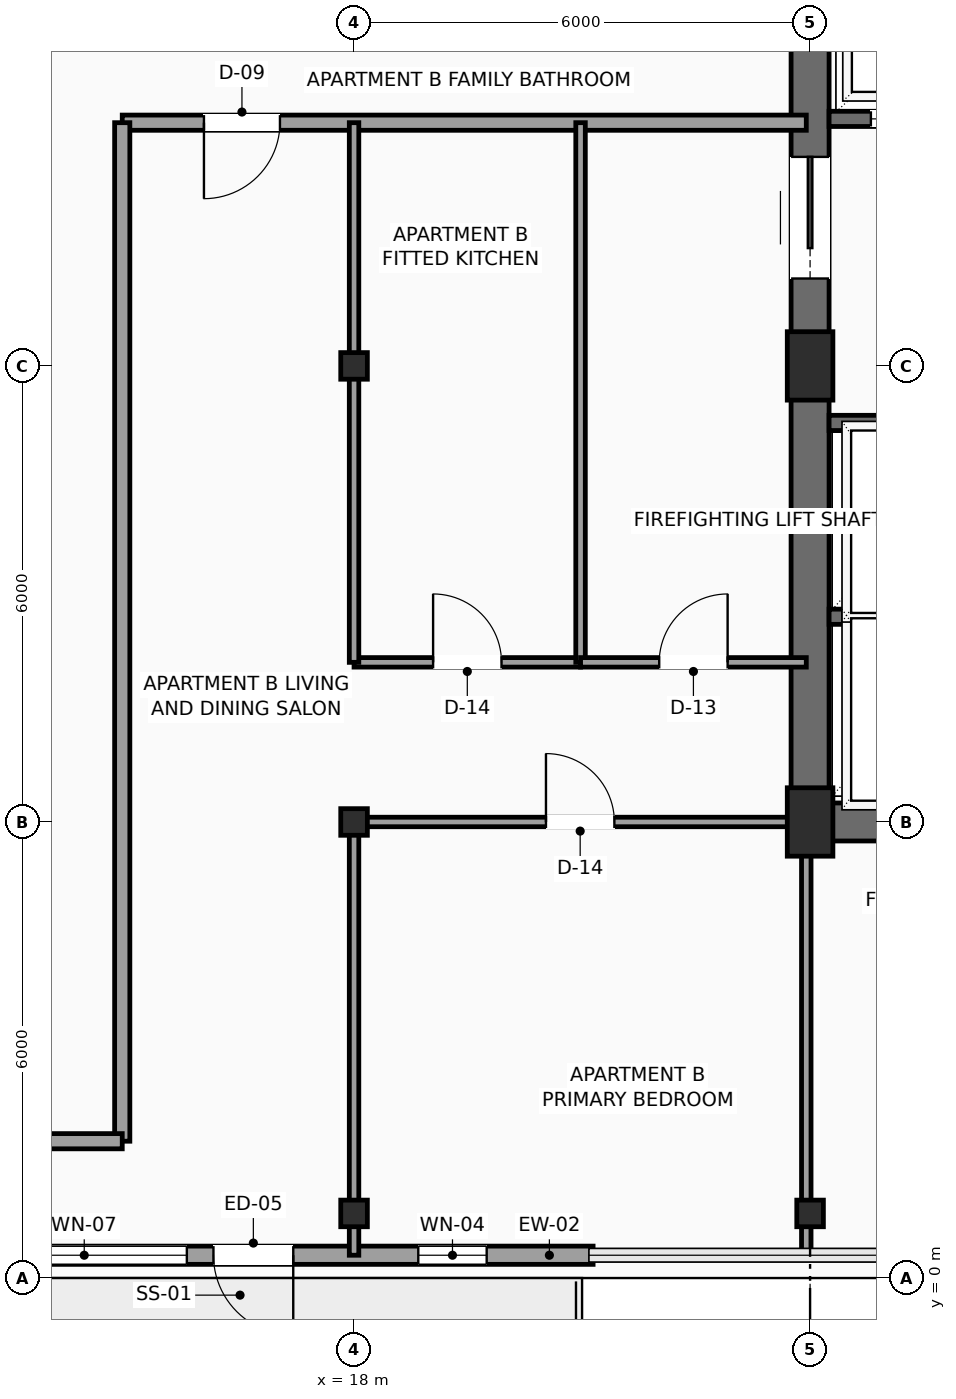
"""IFC4 building model, lengths in metres.
Left out: names, types, materials, properties, quantities, classifications, styles, units other than length and angle.
Written with IfcOpenShell. Run it as: python <this file> out.ifc"""

import sys

from ifc_helpers import new_model, si_unit, direction, frame, frame_2d, origin, origin_2d, place, context, subcontext, project, spatial, rectangle, hollow_rectangle, extrude, element, fill, save


model = new_model("IFC4")
c1 = context("Model", 3, precision=1e-05, world=origin(), true_north=direction((0.0, 1.0)))
c2 = subcontext(c1, "Body", "Model", "MODEL_VIEW")
j1 = project(units=[si_unit("LENGTHUNIT", "METRE"), si_unit("PLANEANGLEUNIT", "RADIAN")], contexts=[c1])
p1 = place(None, origin())
s1 = spatial("IfcSite", under=j1, at=p1, CompositionType="ELEMENT")
p2 = place(p1, origin())
s2 = spatial("IfcBuilding", under=s1, at=p2, CompositionType="ELEMENT")
p3 = place(p2, frame((0.0, 0.0, 253.7)))
s3 = spatial("IfcBuildingStorey", under=s2, at=p3, CompositionType="ELEMENT", Elevation=253.7)
for number, where, z_axis, x_axis in (
    (1, (24.0, 6.0, 0.0), (0.0, 0.0, 1.0), (1.0, 0.0, 0.0)),
    (2, (24.0, 12.0, 0.0), (0.0, 0.0, 1.0), (1.0, 0.0, 0.0)),
):
    element("IfcColumn", number, at=place(p3, frame(where, z_axis=z_axis, x_axis=x_axis)), inside=s3, PredefinedType="COLUMN", context=c2, shape_type="SweptSolid", body=[
        extrude(rectangle(XDim=0.6, YDim=0.9, at=origin_2d()), origin(), (0.0, 0.0, 1.0), 3.5),
    ])
for number, where, z_axis, x_axis in (
    (3, (18.0, 0.85, 0.0), (0.0, 0.0, 1.0), (1.0, 0.0, 0.0)),
    (4, (18.0, 6.0, 0.0), (0.0, 0.0, 1.0), (1.0, 0.0, 0.0)),
    (5, (18.0, 12.0, 0.0), (0.0, 0.0, 1.0), (1.0, 0.0, 0.0)),
    (6, (24.0, 0.85, 0.0), (0.0, 0.0, 1.0), (1.0, 0.0, 0.0)),
):
    element("IfcColumn", number, at=place(p3, frame(where, z_axis=z_axis, x_axis=x_axis)), inside=s3, PredefinedType="COLUMN", context=c2, shape_type="SweptSolid", body=[
        extrude(hollow_rectangle(XDim=0.35, YDim=0.35, WallThickness=0.016, InnerFilletRadius=0.016, OuterFilletRadius=0.032, at=origin_2d()), origin(), (0.0, 0.0, 1.0), 3.5),
    ])
p4 = place(p3, frame((21.145, 0.3, 0.0), z_axis=(0.0, 0.0, 1.0), x_axis=(-1.0, 0.0, 0.0)))
e7 = element("IfcWall", 7, at=p4, inside=s3, PredefinedType="SOLIDWALL", context=c2, shape_type="SweptSolid", body=[
    extrude(rectangle(XDim=9.29, YDim=0.24, at=frame_2d((4.645, 0.0))), origin(), (0.0, 0.0, 1.0), 3.3),
])
p5 = place(p4, frame((3.945, 0.0, 0.0)))
e8 = element("IfcOpeningElement", 8, at=p5, cuts=e7, PredefinedType="OPENING", context=c2, shape_type="SweptSolid", body=[
    extrude(rectangle(XDim=1.05, YDim=2.2, at=frame_2d((0.525, 1.1))), frame((0.0, 0.13, 0.0), z_axis=(0.0, -1.0, 0.0), x_axis=(1.0, 0.0, 0.0)), (0.0, 0.0, 1.0), 0.26),
])
p6 = place(p4, frame((5.345, 0.0, 0.6)))
e9 = element("IfcOpeningElement", 9, at=p6, cuts=e7, PredefinedType="OPENING", context=c2, shape_type="SweptSolid", body=[
    extrude(rectangle(XDim=2.7, YDim=2.3, at=frame_2d((1.35, 1.15))), frame((0.0, 0.13, 0.0), z_axis=(0.0, -1.0, 0.0), x_axis=(1.0, 0.0, 0.0)), (0.0, 0.0, 1.0), 0.26),
])
p7 = place(p4, frame((1.4, 0.0, 0.6)))
e10 = element("IfcOpeningElement", 10, at=p7, cuts=e7, PredefinedType="OPENING", context=c2, shape_type="SweptSolid", body=[
    extrude(rectangle(XDim=0.9, YDim=2.2, at=frame_2d((0.45, 1.1))), frame((0.0, 0.13, 0.0), z_axis=(0.0, -1.0, 0.0), x_axis=(1.0, 0.0, 0.0)), (0.0, 0.0, 1.0), 0.26),
])
p8 = place(p3, frame((24.0, 6.0, 0.0), z_axis=(0.0, 0.0, 1.0), x_axis=(1.0, 0.0, 0.0)))
e11 = element("IfcWall", 11, at=p8, inside=s3, PredefinedType="SHEAR", context=c2, shape_type="SweptSolid", body=[
    extrude(rectangle(XDim=9.6, YDim=0.5, at=frame_2d((4.8, 0.0))), origin(), (0.0, 0.0, 1.0), 3.3),
])
p9 = place(p3, frame((24.0, 6.0, 0.0), z_axis=(0.0, 0.0, 1.0), x_axis=(0.0, 1.0, 0.0)))
e12 = element("IfcWall", 12, at=p9, inside=s3, PredefinedType="SHEAR", context=c2, shape_type="SweptSolid", body=[
    extrude(rectangle(XDim=12.0, YDim=0.5, at=frame_2d((6.0, 0.0))), origin(), (0.0, 0.0, 1.0), 3.3),
])
p10 = place(p9, frame((7.15, 0.0, 0.0)))
e13 = element("IfcOpeningElement", 13, at=p10, cuts=e12, PredefinedType="OPENING", context=c2, shape_type="SweptSolid", body=[
    extrude(rectangle(XDim=1.6, YDim=2.3, at=frame_2d((0.8, 1.15))), frame((0.0, 0.26, 0.0), z_axis=(0.0, -1.0, 0.0), x_axis=(1.0, 0.0, 0.0)), (0.0, 0.0, 1.0), 0.52),
])
for number, where, z_axis, x_axis in (
    (14, (24.25, 8.7, 0.0), (0.0, 0.0, 1.0), (1.0, 0.0, 0.0)),
    (15, (24.25, 11.25, 0.0), (0.0, 0.0, 1.0), (1.0, 0.0, 0.0)),
):
    element("IfcWall", number, at=place(p3, frame(where, z_axis=z_axis, x_axis=x_axis)), inside=s3, PredefinedType="SHEAR", context=c2, shape_type="SweptSolid", body=[
        extrude(rectangle(XDim=2.17, YDim=0.2, at=frame_2d((1.085, 0.0))), origin(), (0.0, 0.0, 1.0), 3.3),
    ])
p11 = place(p3, frame((24.25, 15.25, 0.0), z_axis=(0.0, 0.0, 1.0), x_axis=(1.0, 0.0, 0.0)))
e16 = element("IfcWall", 16, at=p11, inside=s3, PredefinedType="SHEAR", context=c2, shape_type="SweptSolid", body=[
    extrude(rectangle(XDim=5.2, YDim=0.2, at=frame_2d((2.6, 0.0))), origin(), (0.0, 0.0, 1.0), 3.3),
])
p12 = place(p11, frame((0.55, 0.0, 0.0)))
e17 = element("IfcOpeningElement", 17, at=p12, cuts=e16, PredefinedType="OPENING", context=c2, shape_type="SweptSolid", body=[
    extrude(rectangle(XDim=1.2, YDim=2.2, at=frame_2d((0.6, 1.1))), frame((0.0, 0.11, 0.0), z_axis=(0.0, -1.0, 0.0), x_axis=(1.0, 0.0, 0.0)), (0.0, 0.0, 1.0), 0.22),
])
p13 = place(p11, frame((3.15, 0.0, 0.0)))
e18 = element("IfcOpeningElement", 18, at=p13, cuts=e16, PredefinedType="OPENING", context=c2, shape_type="SweptSolid", body=[
    extrude(rectangle(XDim=1.2, YDim=2.2, at=frame_2d((0.6, 1.1))), frame((0.0, 0.11, 0.0), z_axis=(0.0, -1.0, 0.0), x_axis=(1.0, 0.0, 0.0)), (0.0, 0.0, 1.0), 0.22),
])
p14 = place(p3, frame((23.95, 15.2, 0.0), z_axis=(0.0, 0.0, 1.0), x_axis=(-1.0, 0.0, 0.0)))
e19 = element("IfcWall", 19, at=p14, inside=s3, PredefinedType="SOLIDWALL", context=c2, shape_type="SweptSolid", body=[
    extrude(rectangle(XDim=9.0, YDim=0.2, at=frame_2d((4.5, 0.0))), origin(), (0.0, 0.0, 1.0), 2.932),
])
p15 = place(p14, frame((6.925, 0.0, 0.0)))
e20 = element("IfcOpeningElement", 20, at=p15, cuts=e19, PredefinedType="OPENING", context=c2, shape_type="SweptSolid", body=[
    extrude(rectangle(XDim=1.0, YDim=2.2, at=frame_2d((0.5, 1.1))), frame((0.0, 0.11, 0.0), z_axis=(0.0, -1.0, 0.0), x_axis=(1.0, 0.0, 0.0)), (0.0, 0.0, 1.0), 0.22),
])
p16 = place(p3, frame((14.95, 15.2, 0.0), z_axis=(0.0, 0.0, 1.0), x_axis=(0.0, -1.0, 0.0)))
e21 = element("IfcWall", 21, at=p16, inside=s3, PredefinedType="SOLIDWALL", context=c2, shape_type="SweptSolid", body=[
    extrude(rectangle(XDim=13.4, YDim=0.2, at=frame_2d((6.7, 0.0))), origin(), (0.0, 0.0, 1.0), 3.3),
])
p17 = place(p3, frame((14.95, 1.8, 0.0), z_axis=(0.0, 0.0, 1.0), x_axis=(-1.0, 0.0, 0.0)))
e22 = element("IfcWall", 22, at=p17, inside=s3, PredefinedType="SOLIDWALL", context=c2, shape_type="SweptSolid", body=[
    extrude(rectangle(XDim=2.35, YDim=0.2, at=frame_2d((1.175, 0.0))), origin(), (0.0, 0.0, 1.0), 3.3),
])
p18 = place(p3, frame((18.0, 8.1, 0.0), z_axis=(0.0, 0.0, 1.0), x_axis=(1.0, 0.0, 0.0)))
e23 = element("IfcWall", 23, at=p18, inside=s3, PredefinedType="PARTITIONING", context=c2, shape_type="SweptSolid", body=[
    extrude(rectangle(XDim=2.98, YDim=0.125, at=frame_2d((1.49, 0.0))), origin(), (0.0, 0.0, 1.0), 3.3),
])
p19 = place(p18, frame((1.04, 0.0, 0.0)))
e24 = element("IfcOpeningElement", 24, at=p19, cuts=e23, PredefinedType="OPENING", context=c2, shape_type="SweptSolid", body=[
    extrude(rectangle(XDim=0.9, YDim=2.1, at=frame_2d((0.45, 1.05))), frame((0.0, 0.073, 0.0), z_axis=(0.0, -1.0, 0.0), x_axis=(1.0, 0.0, 0.0)), (0.0, 0.0, 1.0), 0.145),
])
p20 = place(p3, frame((18.0, 8.1, 0.0), z_axis=(0.0, 0.0, 1.0), x_axis=(0.0, 1.0, 0.0)))
e25 = element("IfcWall", 25, at=p20, inside=s3, PredefinedType="PARTITIONING", context=c2, shape_type="SweptSolid", body=[
    extrude(rectangle(XDim=7.1, YDim=0.125, at=frame_2d((3.55, 0.0))), origin(), (0.0, 0.0, 1.0), 2.992),
])
p21 = place(p3, frame((20.98, 8.1, 0.0), z_axis=(0.0, 0.0, 1.0), x_axis=(0.0, 1.0, 0.0)))
e26 = element("IfcWall", 26, at=p21, inside=s3, PredefinedType="PARTITIONING", context=c2, shape_type="SweptSolid", body=[
    extrude(rectangle(XDim=7.1, YDim=0.125, at=frame_2d((3.55, 0.0))), origin(), (0.0, 0.0, 1.0), 3.3),
])
p22 = place(p3, frame((20.98, 8.1, 0.0), z_axis=(0.0, 0.0, 1.0), x_axis=(1.0, 0.0, 0.0)))
e27 = element("IfcWall", 27, at=p22, inside=s3, PredefinedType="PARTITIONING", context=c2, shape_type="SweptSolid", body=[
    extrude(rectangle(XDim=2.97, YDim=0.125, at=frame_2d((1.485, 0.0))), origin(), (0.0, 0.0, 1.0), 3.3),
])
p23 = place(p22, frame((1.035, 0.0, 0.0)))
e28 = element("IfcOpeningElement", 28, at=p23, cuts=e27, PredefinedType="OPENING", context=c2, shape_type="SweptSolid", body=[
    extrude(rectangle(XDim=0.9, YDim=2.1, at=frame_2d((0.45, 1.05))), frame((0.0, 0.073, 0.0), z_axis=(0.0, -1.0, 0.0), x_axis=(1.0, 0.0, 0.0)), (0.0, 0.0, 1.0), 0.145),
])
p24 = place(p3, frame((18.0, 6.0, 0.0), z_axis=(0.0, 0.0, 1.0), x_axis=(1.0, 0.0, 0.0)))
e29 = element("IfcWall", 29, at=p24, inside=s3, PredefinedType="PARTITIONING", context=c2, shape_type="SweptSolid", body=[
    extrude(rectangle(XDim=5.95, YDim=0.125, at=frame_2d((2.975, 0.0))), origin(), (0.0, 0.0, 1.0), 2.992),
])
p25 = place(p24, frame((2.525, 0.0, 0.0)))
e30 = element("IfcOpeningElement", 30, at=p25, cuts=e29, PredefinedType="OPENING", context=c2, shape_type="SweptSolid", body=[
    extrude(rectangle(XDim=0.9, YDim=2.1, at=frame_2d((0.45, 1.05))), frame((0.0, 0.073, 0.0), z_axis=(0.0, -1.0, 0.0), x_axis=(1.0, 0.0, 0.0)), (0.0, 0.0, 1.0), 0.145),
])
p26 = place(p3, frame((18.0, 0.3, 0.0), z_axis=(0.0, 0.0, 1.0), x_axis=(0.0, 1.0, 0.0)))
e31 = element("IfcWall", 31, at=p26, inside=s3, PredefinedType="PARTITIONING", context=c2, shape_type="SweptSolid", body=[
    extrude(rectangle(XDim=5.7, YDim=0.125, at=frame_2d((2.85, 0.0))), origin(), (0.0, 0.0, 1.0), 2.992),
])
p27 = place(p3, frame((23.95, 0.3, 0.0), z_axis=(0.0, 0.0, 1.0), x_axis=(0.0, 1.0, 0.0)))
e32 = element("IfcWall", 32, at=p27, inside=s3, PredefinedType="PARTITIONING", context=c2, shape_type="SweptSolid", body=[
    extrude(rectangle(XDim=5.7, YDim=0.125, at=frame_2d((2.85, 0.0))), origin(), (0.0, 0.0, 1.0), 2.967),
])
p28 = place(p5, origin())
e33 = element("IfcDoor", 33, at=p28, inside=s3, OperationType="SINGLE_SWING_LEFT", PredefinedType="DOOR", context=c2, shape_type="SweptSolid", body=[
    extrude(rectangle(XDim=1.05, YDim=2.2, at=frame_2d((0.525, 1.1))), frame((0.0, 0.025, 0.0), z_axis=(0.0, -1.0, 0.0), x_axis=(1.0, 0.0, 0.0)), (0.0, 0.0, 1.0), 0.05),
])
fill(e8, e33)
p29 = place(p6, origin())
e34 = element("IfcWindow", 34, at=p29, inside=s3, PartitioningType="SINGLE_PANEL", PredefinedType="WINDOW", context=c2, shape_type="SweptSolid", body=[
    extrude(rectangle(XDim=2.7, YDim=2.3, at=frame_2d((1.35, 1.15))), frame((0.0, 0.03, 0.0), z_axis=(0.0, -1.0, 0.0), x_axis=(1.0, 0.0, 0.0)), (0.0, 0.0, 1.0), 0.06),
])
fill(e9, e34)
p30 = place(p7, origin())
e35 = element("IfcWindow", 35, at=p30, inside=s3, PartitioningType="SINGLE_PANEL", PredefinedType="WINDOW", context=c2, shape_type="SweptSolid", body=[
    extrude(rectangle(XDim=0.9, YDim=2.2, at=frame_2d((0.45, 1.1))), frame((0.0, 0.03, 0.0), z_axis=(0.0, -1.0, 0.0), x_axis=(1.0, 0.0, 0.0)), (0.0, 0.0, 1.0), 0.06),
])
fill(e10, e35)
p31 = place(p10, origin())
e36 = element("IfcDoor", 36, at=p31, inside=s3, OperationType="DOUBLE_DOOR_SLIDING", PredefinedType="DOOR", context=c2, shape_type="SweptSolid", body=[
    extrude(rectangle(XDim=1.6, YDim=2.3, at=frame_2d((0.8, 1.15))), frame((0.0, 0.025, 0.0), z_axis=(0.0, -1.0, 0.0), x_axis=(1.0, 0.0, 0.0)), (0.0, 0.0, 1.0), 0.05),
])
fill(e13, e36)
p32 = place(p12, origin())
e37 = element("IfcDoor", 37, at=p32, inside=s3, OperationType="SLIDING_TO_RIGHT", PredefinedType="DOOR", context=c2, shape_type="SweptSolid", body=[
    extrude(rectangle(XDim=1.2, YDim=2.2, at=frame_2d((0.6, 1.1))), frame((0.0, 0.025, 0.0), z_axis=(0.0, -1.0, 0.0), x_axis=(1.0, 0.0, 0.0)), (0.0, 0.0, 1.0), 0.05),
])
fill(e17, e37)
p33 = place(p15, origin())
e38 = element("IfcDoor", 38, at=p33, inside=s3, OperationType="SINGLE_SWING_RIGHT", PredefinedType="DOOR", context=c2, shape_type="SweptSolid", body=[
    extrude(rectangle(XDim=1.0, YDim=2.2, at=frame_2d((0.5, 1.1))), frame((0.0, 0.025, 0.0), z_axis=(0.0, -1.0, 0.0), x_axis=(1.0, 0.0, 0.0)), (0.0, 0.0, 1.0), 0.05),
])
fill(e20, e38)
p34 = place(p19, origin())
e39 = element("IfcDoor", 39, at=p34, inside=s3, OperationType="SINGLE_SWING_LEFT", PredefinedType="DOOR", context=c2, shape_type="SweptSolid", body=[
    extrude(rectangle(XDim=0.9, YDim=2.1, at=frame_2d((0.45, 1.05))), frame((0.0, 0.025, 0.0), z_axis=(0.0, -1.0, 0.0), x_axis=(1.0, 0.0, 0.0)), (0.0, 0.0, 1.0), 0.05),
])
fill(e24, e39)
p35 = place(p23, origin())
e40 = element("IfcDoor", 40, at=p35, inside=s3, OperationType="SINGLE_SWING_RIGHT", PredefinedType="DOOR", context=c2, shape_type="SweptSolid", body=[
    extrude(rectangle(XDim=0.9, YDim=2.1, at=frame_2d((0.45, 1.05))), frame((0.0, 0.025, 0.0), z_axis=(0.0, -1.0, 0.0), x_axis=(1.0, 0.0, 0.0)), (0.0, 0.0, 1.0), 0.05),
])
fill(e28, e40)
p36 = place(p25, origin())
e41 = element("IfcDoor", 41, at=p36, inside=s3, OperationType="SINGLE_SWING_LEFT", PredefinedType="DOOR", context=c2, shape_type="SweptSolid", body=[
    extrude(rectangle(XDim=0.9, YDim=2.1, at=frame_2d((0.45, 1.05))), frame((0.0, 0.025, 0.0), z_axis=(0.0, -1.0, 0.0), x_axis=(1.0, 0.0, 0.0)), (0.0, 0.0, 1.0), 0.05),
])
fill(e30, e41)
save(model, sys.argv[1])
